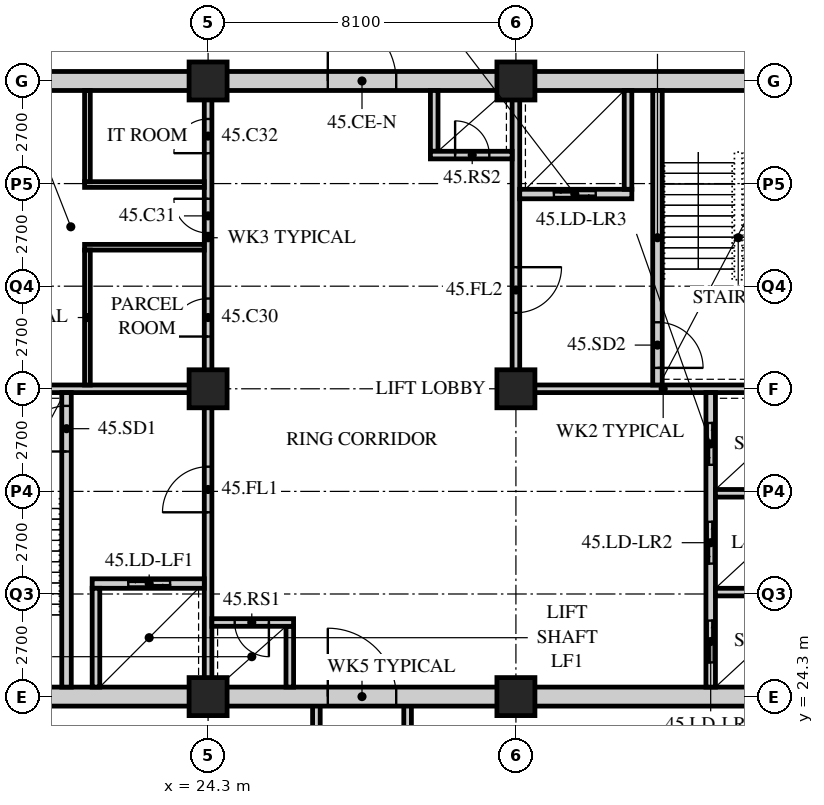
"""IFC4 building model, lengths in metres.
Left out: names, types, materials, properties, quantities, classifications, styles, units other than length and angle.
Written with IfcOpenShell. Run it as: python <this file> out.ifc"""

import sys

from ifc_helpers import new_model, si_unit, direction, frame, frame_2d, origin, origin_2d, place, context, subcontext, project, spatial, rectangle, hollow_rectangle, extrude, element, fill, save


model = new_model("IFC4")
c1 = context("Model", 3, precision=1e-05, world=origin(), true_north=direction((0.0, 1.0)))
c2 = subcontext(c1, "Body", "Model", "MODEL_VIEW")
j1 = project(units=[si_unit("LENGTHUNIT", "METRE"), si_unit("PLANEANGLEUNIT", "RADIAN")], contexts=[c1])
p1 = place(None, origin())
s1 = spatial("IfcSite", under=j1, at=p1, CompositionType="ELEMENT")
p2 = place(p1, origin())
s2 = spatial("IfcBuilding", under=s1, at=p2, CompositionType="ELEMENT")
p3 = place(p2, frame((0.0, 0.0, 177.6)))
s3 = spatial("IfcBuildingStorey", under=s2, at=p3, CompositionType="ELEMENT", Elevation=177.6)
for number, where, z_axis, x_axis in (
    (1, (24.3, 24.3, 0.0), (0.0, 0.0, 1.0), (1.0, 0.0, 0.0)),
    (2, (24.3, 32.4, 0.0), (0.0, 0.0, 1.0), (1.0, 0.0, 0.0)),
    (3, (24.3, 40.5, 0.0), (0.0, 0.0, 1.0), (1.0, 0.0, 0.0)),
    (4, (32.4, 24.3, 0.0), (0.0, 0.0, 1.0), (1.0, 0.0, 0.0)),
    (5, (32.4, 32.4, 0.0), (0.0, 0.0, 1.0), (1.0, 0.0, 0.0)),
    (6, (32.4, 40.5, 0.0), (0.0, 0.0, 1.0), (1.0, 0.0, 0.0)),
):
    element("IfcColumn", number, at=place(p3, frame(where, z_axis=z_axis, x_axis=x_axis)), inside=s3, PredefinedType="COLUMN", context=c2, shape_type="SweptSolid", body=[
        extrude(hollow_rectangle(XDim=1.0, YDim=1.0, WallThickness=0.1, at=origin_2d()), origin(), (0.0, 0.0, 1.0), 3.6),
    ])
for number, where, z_axis, x_axis in (
    (7, (27.15, 20.7, 0.0), (0.0, 0.0, 1.0), (0.0, 1.0, 0.0)),
    (8, (29.55, 20.7, 0.0), (0.0, 0.0, 1.0), (0.0, 1.0, 0.0)),
):
    element("IfcWall", number, at=place(p3, frame(where, z_axis=z_axis, x_axis=x_axis)), inside=s3, PredefinedType="SOLIDWALL", context=c2, shape_type="SweptSolid", body=[
        extrude(rectangle(XDim=3.6, YDim=0.2, at=frame_2d((1.8, 0.0))), origin(), (0.0, 0.0, 1.0), 3.39),
    ])
p4 = place(p3, frame((15.95, 24.3, 0.0), z_axis=(0.0, 0.0, 1.0), x_axis=(1.0, 0.0, 0.0)))
e9 = element("IfcWall", 9, at=p4, inside=s3, PredefinedType="SOLIDWALL", context=c2, shape_type="SweptSolid", body=[
    extrude(rectangle(XDim=24.8, YDim=0.5, at=frame_2d((12.4, 0.0))), origin(), (0.0, 0.0, 1.0), 2.74),
])
p5 = place(p4, frame((11.5, 0.0, 0.0)))
e10 = element("IfcOpeningElement", 10, at=p5, cuts=e9, PredefinedType="OPENING", context=c2, shape_type="SweptSolid", body=[
    extrude(rectangle(XDim=1.8, YDim=2.4, at=frame_2d((0.9, 1.2))), frame((0.0, 0.26, 0.0), z_axis=(0.0, -1.0, 0.0), x_axis=(1.0, 0.0, 0.0)), (0.0, 0.0, 1.0), 0.52),
])
p6 = place(p3, frame((15.95, 40.5, 0.0), z_axis=(0.0, 0.0, 1.0), x_axis=(1.0, 0.0, 0.0)))
e11 = element("IfcWall", 11, at=p6, inside=s3, PredefinedType="SOLIDWALL", context=c2, shape_type="SweptSolid", body=[
    extrude(rectangle(XDim=24.8, YDim=0.5, at=frame_2d((12.4, 0.0))), origin(), (0.0, 0.0, 1.0), 2.74),
])
p7 = place(p6, frame((11.5, 0.0, 0.0)))
e12 = element("IfcOpeningElement", 12, at=p7, cuts=e11, PredefinedType="OPENING", context=c2, shape_type="SweptSolid", body=[
    extrude(rectangle(XDim=1.8, YDim=2.4, at=frame_2d((0.9, 1.2))), frame((0.0, 0.26, 0.0), z_axis=(0.0, -1.0, 0.0), x_axis=(1.0, 0.0, 0.0)), (0.0, 0.0, 1.0), 0.52),
])
p8 = place(p3, frame((16.45, 32.4, 0.0), z_axis=(0.0, 0.0, 1.0), x_axis=(1.0, 0.0, 0.0)))
e13 = element("IfcWall", 13, at=p8, inside=s3, PredefinedType="SOLIDWALL", context=c2, shape_type="SweptSolid", body=[
    extrude(rectangle(XDim=7.95, YDim=0.2, at=frame_2d((3.975, 0.0))), origin(), (0.0, 0.0, 1.0), 2.778),
])
p9 = place(p3, frame((24.3, 24.55, 0.0), z_axis=(0.0, 0.0, 1.0), x_axis=(0.0, 1.0, 0.0)))
e14 = element("IfcWall", 14, at=p9, inside=s3, PredefinedType="SOLIDWALL", context=c2, shape_type="SweptSolid", body=[
    extrude(rectangle(XDim=7.75, YDim=0.2, at=frame_2d((3.875, 0.0))), origin(), (0.0, 0.0, 1.0), 2.778),
])
p10 = place(p9, frame((4.6, 0.0, 0.0)))
e15 = element("IfcOpeningElement", 15, at=p10, cuts=e14, PredefinedType="OPENING", context=c2, shape_type="SweptSolid", body=[
    extrude(rectangle(XDim=1.2, YDim=2.1, at=frame_2d((0.6, 1.05))), frame((0.0, 0.11, 0.0), z_axis=(0.0, -1.0, 0.0), x_axis=(1.0, 0.0, 0.0)), (0.0, 0.0, 1.0), 0.22),
])
p11 = place(p3, frame((20.575, 24.55, 0.0), z_axis=(0.0, 0.0, 1.0), x_axis=(0.0, 1.0, 0.0)))
e16 = element("IfcWall", 16, at=p11, inside=s3, PredefinedType="SOLIDWALL", context=c2, shape_type="SweptSolid", body=[
    extrude(rectangle(XDim=7.75, YDim=0.25, at=frame_2d((3.875, 0.0))), origin(), (0.0, 0.0, 1.0), 3.39),
])
p12 = place(p11, frame((6.2, 0.0, 0.0)))
e17 = element("IfcOpeningElement", 17, at=p12, cuts=e16, PredefinedType="OPENING", context=c2, shape_type="SweptSolid", body=[
    extrude(rectangle(XDim=1.2, YDim=2.1, at=frame_2d((0.6, 1.05))), frame((0.0, 0.135, 0.0), z_axis=(0.0, -1.0, 0.0), x_axis=(1.0, 0.0, 0.0)), (0.0, 0.0, 1.0), 0.27),
])
p13 = place(p3, frame((21.25, 27.275, 0.0), z_axis=(0.0, 0.0, 1.0), x_axis=(1.0, 0.0, 0.0)))
e18 = element("IfcWall", 18, at=p13, inside=s3, PredefinedType="SOLIDWALL", context=c2, shape_type="SweptSolid", body=[
    extrude(rectangle(XDim=2.95, YDim=0.25, at=frame_2d((1.475, 0.0))), origin(), (0.0, 0.0, 1.0), 3.39),
])
p14 = place(p13, frame((0.95, 0.0, 0.0)))
e19 = element("IfcOpeningElement", 19, at=p14, cuts=e18, PredefinedType="OPENING", context=c2, shape_type="SweptSolid", body=[
    extrude(rectangle(XDim=1.1, YDim=2.4, at=frame_2d((0.55, 1.2))), frame((0.0, 0.135, 0.0), z_axis=(0.0, -1.0, 0.0), x_axis=(1.0, 0.0, 0.0)), (0.0, 0.0, 1.0), 0.27),
])
p15 = place(p3, frame((21.35, 24.55, 0.0), z_axis=(0.0, 0.0, 1.0), x_axis=(0.0, 1.0, 0.0)))
e20 = element("IfcWall", 20, at=p15, inside=s3, PredefinedType="SOLIDWALL", context=c2, shape_type="SweptSolid", body=[
    extrude(rectangle(XDim=2.6, YDim=0.2, at=frame_2d((1.3, 0.0))), origin(), (0.0, 0.0, 1.0), 3.39),
])
p16 = place(p3, frame((26.45, 24.55, 0.0), z_axis=(0.0, 0.0, 1.0), x_axis=(0.0, 1.0, 0.0)))
e21 = element("IfcWall", 21, at=p16, inside=s3, PredefinedType="SOLIDWALL", context=c2, shape_type="SweptSolid", body=[
    extrude(rectangle(XDim=1.6, YDim=0.2, at=frame_2d((0.8, 0.0))), origin(), (0.0, 0.0, 1.0), 3.39),
])
p17 = place(p3, frame((24.4, 26.25, 0.0), z_axis=(0.0, 0.0, 1.0), x_axis=(1.0, 0.0, 0.0)))
e22 = element("IfcWall", 22, at=p17, inside=s3, PredefinedType="SOLIDWALL", context=c2, shape_type="SweptSolid", body=[
    extrude(rectangle(XDim=2.15, YDim=0.2, at=frame_2d((1.075, 0.0))), origin(), (0.0, 0.0, 1.0), 3.39),
])
p18 = place(p17, frame((0.6, 0.0, 0.0)))
e23 = element("IfcOpeningElement", 23, at=p18, cuts=e22, PredefinedType="OPENING", context=c2, shape_type="SweptSolid", body=[
    extrude(rectangle(XDim=0.9, YDim=2.1, at=frame_2d((0.45, 1.05))), frame((0.0, 0.11, 0.0), z_axis=(0.0, -1.0, 0.0), x_axis=(1.0, 0.0, 0.0)), (0.0, 0.0, 1.0), 0.22),
])
p19 = place(p3, frame((32.3, 32.4, 0.0), z_axis=(0.0, 0.0, 1.0), x_axis=(1.0, 0.0, 0.0)))
e24 = element("IfcWall", 24, at=p19, inside=s3, PredefinedType="SOLIDWALL", context=c2, shape_type="SweptSolid", body=[
    extrude(rectangle(XDim=7.95, YDim=0.2, at=frame_2d((3.975, 0.0))), origin(), (0.0, 0.0, 1.0), 2.778),
])
p20 = place(p3, frame((32.4, 32.5, 0.0), z_axis=(0.0, 0.0, 1.0), x_axis=(0.0, 1.0, 0.0)))
e25 = element("IfcWall", 25, at=p20, inside=s3, PredefinedType="SOLIDWALL", context=c2, shape_type="SweptSolid", body=[
    extrude(rectangle(XDim=7.75, YDim=0.2, at=frame_2d((3.875, 0.0))), origin(), (0.0, 0.0, 1.0), 2.778),
])
p21 = place(p20, frame((1.9, 0.0, 0.0)))
e26 = element("IfcOpeningElement", 26, at=p21, cuts=e25, PredefinedType="OPENING", context=c2, shape_type="SweptSolid", body=[
    extrude(rectangle(XDim=1.2, YDim=2.1, at=frame_2d((0.6, 1.05))), frame((0.0, 0.11, 0.0), z_axis=(0.0, -1.0, 0.0), x_axis=(1.0, 0.0, 0.0)), (0.0, 0.0, 1.0), 0.22),
])
p22 = place(p3, frame((37.525, 24.55, 0.0), z_axis=(0.0, 0.0, 1.0), x_axis=(0.0, 1.0, 0.0)))
e27 = element("IfcWall", 27, at=p22, inside=s3, PredefinedType="SOLIDWALL", context=c2, shape_type="SweptSolid", body=[
    extrude(rectangle(XDim=7.75, YDim=0.25, at=frame_2d((3.875, 0.0))), origin(), (0.0, 0.0, 1.0), 3.39),
])
p23 = place(p22, frame((0.65, 0.0, 0.0)))
e28 = element("IfcOpeningElement", 28, at=p23, cuts=e27, PredefinedType="OPENING", context=c2, shape_type="SweptSolid", body=[
    extrude(rectangle(XDim=1.1, YDim=2.4, at=frame_2d((0.55, 1.2))), frame((0.0, 0.135, 0.0), z_axis=(0.0, -1.0, 0.0), x_axis=(1.0, 0.0, 0.0)), (0.0, 0.0, 1.0), 0.27),
])
p24 = place(p22, frame((3.25, 0.0, 0.0)))
e29 = element("IfcOpeningElement", 29, at=p24, cuts=e27, PredefinedType="OPENING", context=c2, shape_type="SweptSolid", body=[
    extrude(rectangle(XDim=1.1, YDim=2.4, at=frame_2d((0.55, 1.2))), frame((0.0, 0.135, 0.0), z_axis=(0.0, -1.0, 0.0), x_axis=(1.0, 0.0, 0.0)), (0.0, 0.0, 1.0), 0.27),
])
p25 = place(p22, frame((5.85, 0.0, 0.0)))
e30 = element("IfcOpeningElement", 30, at=p25, cuts=e27, PredefinedType="OPENING", context=c2, shape_type="SweptSolid", body=[
    extrude(rectangle(XDim=1.1, YDim=2.4, at=frame_2d((0.55, 1.2))), frame((0.0, 0.135, 0.0), z_axis=(0.0, -1.0, 0.0), x_axis=(1.0, 0.0, 0.0)), (0.0, 0.0, 1.0), 0.27),
])
for number, where, z_axis, x_axis in (
    (31, (37.65, 27.05, 0.0), (0.0, 0.0, 1.0), (1.0, 0.0, 0.0)),
    (32, (37.65, 29.65, 0.0), (0.0, 0.0, 1.0), (1.0, 0.0, 0.0)),
):
    element("IfcWall", number, at=place(p3, frame(where, z_axis=z_axis, x_axis=x_axis)), inside=s3, PredefinedType="SOLIDWALL", context=c2, shape_type="SweptSolid", body=[
        extrude(rectangle(XDim=2.6, YDim=0.2, at=frame_2d((1.3, 0.0))), origin(), (0.0, 0.0, 1.0), 3.39),
    ])
p26 = place(p3, frame((36.125, 32.5, 0.0), z_axis=(0.0, 0.0, 1.0), x_axis=(0.0, 1.0, 0.0)))
e33 = element("IfcWall", 33, at=p26, inside=s3, PredefinedType="SOLIDWALL", context=c2, shape_type="SweptSolid", body=[
    extrude(rectangle(XDim=7.75, YDim=0.25, at=frame_2d((3.875, 0.0))), origin(), (0.0, 0.0, 1.0), 3.39),
])
p27 = place(p26, frame((0.45, 0.0, 0.0)))
e34 = element("IfcOpeningElement", 34, at=p27, cuts=e33, PredefinedType="OPENING", context=c2, shape_type="SweptSolid", body=[
    extrude(rectangle(XDim=1.2, YDim=2.1, at=frame_2d((0.6, 1.05))), frame((0.0, 0.135, 0.0), z_axis=(0.0, -1.0, 0.0), x_axis=(1.0, 0.0, 0.0)), (0.0, 0.0, 1.0), 0.27),
])
p28 = place(p3, frame((32.5, 37.525, 0.0), z_axis=(0.0, 0.0, 1.0), x_axis=(1.0, 0.0, 0.0)))
e35 = element("IfcWall", 35, at=p28, inside=s3, PredefinedType="SOLIDWALL", context=c2, shape_type="SweptSolid", body=[
    extrude(rectangle(XDim=2.95, YDim=0.25, at=frame_2d((1.475, 0.0))), origin(), (0.0, 0.0, 1.0), 3.39),
])
p29 = place(p28, frame((0.9, 0.0, 0.0)))
e36 = element("IfcOpeningElement", 36, at=p29, cuts=e35, PredefinedType="OPENING", context=c2, shape_type="SweptSolid", body=[
    extrude(rectangle(XDim=1.1, YDim=2.4, at=frame_2d((0.55, 1.2))), frame((0.0, 0.135, 0.0), z_axis=(0.0, -1.0, 0.0), x_axis=(1.0, 0.0, 0.0)), (0.0, 0.0, 1.0), 0.27),
])
p30 = place(p3, frame((35.35, 37.65, 0.0), z_axis=(0.0, 0.0, 1.0), x_axis=(0.0, 1.0, 0.0)))
e37 = element("IfcWall", 37, at=p30, inside=s3, PredefinedType="SOLIDWALL", context=c2, shape_type="SweptSolid", body=[
    extrude(rectangle(XDim=2.6, YDim=0.2, at=frame_2d((1.3, 0.0))), origin(), (0.0, 0.0, 1.0), 3.39),
])
p31 = place(p3, frame((30.25, 38.65, 0.0), z_axis=(0.0, 0.0, 1.0), x_axis=(0.0, 1.0, 0.0)))
e38 = element("IfcWall", 38, at=p31, inside=s3, PredefinedType="SOLIDWALL", context=c2, shape_type="SweptSolid", body=[
    extrude(rectangle(XDim=1.6, YDim=0.2, at=frame_2d((0.8, 0.0))), origin(), (0.0, 0.0, 1.0), 3.39),
])
p32 = place(p3, frame((30.15, 38.55, 0.0), z_axis=(0.0, 0.0, 1.0), x_axis=(1.0, 0.0, 0.0)))
e39 = element("IfcWall", 39, at=p32, inside=s3, PredefinedType="SOLIDWALL", context=c2, shape_type="SweptSolid", body=[
    extrude(rectangle(XDim=2.15, YDim=0.2, at=frame_2d((1.075, 0.0))), origin(), (0.0, 0.0, 1.0), 3.39),
])
p33 = place(p32, frame((0.65, 0.0, 0.0)))
e40 = element("IfcOpeningElement", 40, at=p33, cuts=e39, PredefinedType="OPENING", context=c2, shape_type="SweptSolid", body=[
    extrude(rectangle(XDim=0.9, YDim=2.1, at=frame_2d((0.45, 1.05))), frame((0.0, 0.11, 0.0), z_axis=(0.0, -1.0, 0.0), x_axis=(1.0, 0.0, 0.0)), (0.0, 0.0, 1.0), 0.22),
])
p34 = place(p3, frame((24.3, 32.5, 0.0), z_axis=(0.0, 0.0, 1.0), x_axis=(0.0, 1.0, 0.0)))
e41 = element("IfcWall", 41, at=p34, inside=s3, PredefinedType="PARTITIONING", context=c2, shape_type="SweptSolid", body=[
    extrude(rectangle(XDim=7.75, YDim=0.2, at=frame_2d((3.875, 0.0))), origin(), (0.0, 0.0, 1.0), 2.778),
])
p35 = place(p34, frame((1.275, 0.0, 0.0)))
e42 = element("IfcOpeningElement", 42, at=p35, cuts=e41, PredefinedType="OPENING", context=c2, shape_type="SweptSolid", body=[
    extrude(rectangle(XDim=1.0, YDim=2.1, at=frame_2d((0.5, 1.05))), frame((0.0, 0.11, 0.0), z_axis=(0.0, -1.0, 0.0), x_axis=(1.0, 0.0, 0.0)), (0.0, 0.0, 1.0), 0.22),
])
p36 = place(p34, frame((4.0, 0.0, 0.0)))
e43 = element("IfcOpeningElement", 43, at=p36, cuts=e41, PredefinedType="OPENING", context=c2, shape_type="SweptSolid", body=[
    extrude(rectangle(XDim=0.9, YDim=2.1, at=frame_2d((0.45, 1.05))), frame((0.0, 0.11, 0.0), z_axis=(0.0, -1.0, 0.0), x_axis=(1.0, 0.0, 0.0)), (0.0, 0.0, 1.0), 0.22),
])
p37 = place(p34, frame((6.1, 0.0, 0.0)))
e44 = element("IfcOpeningElement", 44, at=p37, cuts=e41, PredefinedType="OPENING", context=c2, shape_type="SweptSolid", body=[
    extrude(rectangle(XDim=0.9, YDim=2.1, at=frame_2d((0.45, 1.05))), frame((0.0, 0.11, 0.0), z_axis=(0.0, -1.0, 0.0), x_axis=(1.0, 0.0, 0.0)), (0.0, 0.0, 1.0), 0.22),
])
for number, where, z_axis, x_axis in (
    (45, (21.05, 36.125, 0.0), (0.0, 0.0, 1.0), (1.0, 0.0, 0.0)),
    (46, (21.05, 37.775, 0.0), (0.0, 0.0, 1.0), (1.0, 0.0, 0.0)),
):
    element("IfcWall", number, at=place(p3, frame(where, z_axis=z_axis, x_axis=x_axis)), inside=s3, PredefinedType="PARTITIONING", context=c2, shape_type="SweptSolid", body=[
        extrude(rectangle(XDim=3.15, YDim=0.15, at=frame_2d((1.575, 0.0))), origin(), (0.0, 0.0, 1.0), 3.39),
    ])
p38 = place(p3, frame((21.125, 32.5, 0.0), z_axis=(0.0, 0.0, 1.0), x_axis=(0.0, 1.0, 0.0)))
e47 = element("IfcWall", 47, at=p38, inside=s3, PredefinedType="PARTITIONING", context=c2, shape_type="SweptSolid", body=[
    extrude(rectangle(XDim=3.55, YDim=0.15, at=frame_2d((1.775, 0.0))), origin(), (0.0, 0.0, 1.0), 3.39),
])
p39 = place(p3, frame((21.125, 37.85, 0.0), z_axis=(0.0, 0.0, 1.0), x_axis=(0.0, 1.0, 0.0)))
e48 = element("IfcWall", 48, at=p39, inside=s3, PredefinedType="PARTITIONING", context=c2, shape_type="SweptSolid", body=[
    extrude(rectangle(XDim=2.4, YDim=0.15, at=frame_2d((1.2, 0.0))), origin(), (0.0, 0.0, 1.0), 3.39),
])
p40 = place(p35, origin())
e49 = element("IfcDoor", 49, at=p40, inside=s3, OperationType="SINGLE_SWING_LEFT", PredefinedType="DOOR", context=c2, shape_type="SweptSolid", body=[
    extrude(rectangle(XDim=1.0, YDim=2.1, at=frame_2d((0.5, 1.05))), frame((0.0, 0.025, 0.0), z_axis=(0.0, -1.0, 0.0), x_axis=(1.0, 0.0, 0.0)), (0.0, 0.0, 1.0), 0.05),
])
fill(e42, e49)
p41 = place(p36, origin())
e50 = element("IfcDoor", 50, at=p41, inside=s3, OperationType="SINGLE_SWING_RIGHT", PredefinedType="DOOR", context=c2, shape_type="SweptSolid", body=[
    extrude(rectangle(XDim=0.9, YDim=2.1, at=frame_2d((0.45, 1.05))), frame((0.0, 0.025, 0.0), z_axis=(0.0, -1.0, 0.0), x_axis=(1.0, 0.0, 0.0)), (0.0, 0.0, 1.0), 0.05),
])
fill(e43, e50)
p42 = place(p37, origin())
e51 = element("IfcDoor", 51, at=p42, inside=s3, OperationType="SINGLE_SWING_LEFT", PredefinedType="DOOR", context=c2, shape_type="SweptSolid", body=[
    extrude(rectangle(XDim=0.9, YDim=2.1, at=frame_2d((0.45, 1.05))), frame((0.0, 0.025, 0.0), z_axis=(0.0, -1.0, 0.0), x_axis=(1.0, 0.0, 0.0)), (0.0, 0.0, 1.0), 0.05),
])
fill(e44, e51)
p43 = place(p12, origin())
e52 = element("IfcDoor", 52, at=p43, inside=s3, OperationType="SINGLE_SWING_LEFT", PredefinedType="DOOR", context=c2, shape_type="SweptSolid", body=[
    extrude(rectangle(XDim=1.2, YDim=2.1, at=frame_2d((0.6, 1.05))), frame((0.0, 0.025, 0.0), z_axis=(0.0, -1.0, 0.0), x_axis=(1.0, 0.0, 0.0)), (0.0, 0.0, 1.0), 0.05),
])
fill(e17, e52)
p44 = place(p10, origin())
e53 = element("IfcDoor", 53, at=p44, inside=s3, OperationType="SINGLE_SWING_LEFT", PredefinedType="DOOR", context=c2, shape_type="SweptSolid", body=[
    extrude(rectangle(XDim=1.2, YDim=2.1, at=frame_2d((0.6, 1.05))), frame((0.0, 0.025, 0.0), z_axis=(0.0, -1.0, 0.0), x_axis=(1.0, 0.0, 0.0)), (0.0, 0.0, 1.0), 0.05),
])
fill(e15, e53)
p45 = place(p18, origin())
e54 = element("IfcDoor", 54, at=p45, inside=s3, OperationType="SINGLE_SWING_LEFT", PredefinedType="DOOR", context=c2, shape_type="SweptSolid", body=[
    extrude(rectangle(XDim=0.9, YDim=2.1, at=frame_2d((0.45, 1.05))), frame((0.0, 0.025, 0.0), z_axis=(0.0, -1.0, 0.0), x_axis=(1.0, 0.0, 0.0)), (0.0, 0.0, 1.0), 0.05),
])
fill(e23, e54)
p46 = place(p27, origin())
e55 = element("IfcDoor", 55, at=p46, inside=s3, OperationType="SINGLE_SWING_RIGHT", PredefinedType="DOOR", context=c2, shape_type="SweptSolid", body=[
    extrude(rectangle(XDim=1.2, YDim=2.1, at=frame_2d((0.6, 1.05))), frame((0.0, 0.025, 0.0), z_axis=(0.0, -1.0, 0.0), x_axis=(1.0, 0.0, 0.0)), (0.0, 0.0, 1.0), 0.05),
])
fill(e34, e55)
p47 = place(p21, origin())
e56 = element("IfcDoor", 56, at=p47, inside=s3, OperationType="SINGLE_SWING_LEFT", PredefinedType="DOOR", context=c2, shape_type="SweptSolid", body=[
    extrude(rectangle(XDim=1.2, YDim=2.1, at=frame_2d((0.6, 1.05))), frame((0.0, 0.025, 0.0), z_axis=(0.0, -1.0, 0.0), x_axis=(1.0, 0.0, 0.0)), (0.0, 0.0, 1.0), 0.05),
])
fill(e26, e56)
p48 = place(p33, origin())
e57 = element("IfcDoor", 57, at=p48, inside=s3, OperationType="SINGLE_SWING_LEFT", PredefinedType="DOOR", context=c2, shape_type="SweptSolid", body=[
    extrude(rectangle(XDim=0.9, YDim=2.1, at=frame_2d((0.45, 1.05))), frame((0.0, 0.025, 0.0), z_axis=(0.0, -1.0, 0.0), x_axis=(1.0, 0.0, 0.0)), (0.0, 0.0, 1.0), 0.05),
])
fill(e40, e57)
p49 = place(p23, origin())
e58 = element("IfcDoor", 58, at=p49, inside=s3, OperationType="DOUBLE_DOOR_SLIDING", PredefinedType="DOOR", context=c2, shape_type="SweptSolid", body=[
    extrude(rectangle(XDim=1.1, YDim=2.4, at=frame_2d((0.55, 1.2))), frame((0.0, 0.025, 0.0), z_axis=(0.0, -1.0, 0.0), x_axis=(1.0, 0.0, 0.0)), (0.0, 0.0, 1.0), 0.05),
])
fill(e28, e58)
p50 = place(p24, origin())
e59 = element("IfcDoor", 59, at=p50, inside=s3, OperationType="DOUBLE_DOOR_SLIDING", PredefinedType="DOOR", context=c2, shape_type="SweptSolid", body=[
    extrude(rectangle(XDim=1.1, YDim=2.4, at=frame_2d((0.55, 1.2))), frame((0.0, 0.025, 0.0), z_axis=(0.0, -1.0, 0.0), x_axis=(1.0, 0.0, 0.0)), (0.0, 0.0, 1.0), 0.05),
])
fill(e29, e59)
p51 = place(p25, origin())
e60 = element("IfcDoor", 60, at=p51, inside=s3, OperationType="DOUBLE_DOOR_SLIDING", PredefinedType="DOOR", context=c2, shape_type="SweptSolid", body=[
    extrude(rectangle(XDim=1.1, YDim=2.4, at=frame_2d((0.55, 1.2))), frame((0.0, 0.025, 0.0), z_axis=(0.0, -1.0, 0.0), x_axis=(1.0, 0.0, 0.0)), (0.0, 0.0, 1.0), 0.05),
])
fill(e30, e60)
p52 = place(p14, origin())
e61 = element("IfcDoor", 61, at=p52, inside=s3, OperationType="DOUBLE_DOOR_SLIDING", PredefinedType="DOOR", context=c2, shape_type="SweptSolid", body=[
    extrude(rectangle(XDim=1.1, YDim=2.4, at=frame_2d((0.55, 1.2))), frame((0.0, 0.025, 0.0), z_axis=(0.0, -1.0, 0.0), x_axis=(1.0, 0.0, 0.0)), (0.0, 0.0, 1.0), 0.05),
])
fill(e19, e61)
p53 = place(p29, origin())
e62 = element("IfcDoor", 62, at=p53, inside=s3, OperationType="DOUBLE_DOOR_SLIDING", PredefinedType="DOOR", context=c2, shape_type="SweptSolid", body=[
    extrude(rectangle(XDim=1.1, YDim=2.4, at=frame_2d((0.55, 1.2))), frame((0.0, 0.025, 0.0), z_axis=(0.0, -1.0, 0.0), x_axis=(1.0, 0.0, 0.0)), (0.0, 0.0, 1.0), 0.05),
])
fill(e36, e62)
p54 = place(p5, origin())
e63 = element("IfcDoor", 63, at=p54, inside=s3, OperationType="DOUBLE_DOOR_SINGLE_SWING", PredefinedType="DOOR", context=c2, shape_type="SweptSolid", body=[
    extrude(rectangle(XDim=1.8, YDim=2.4, at=frame_2d((0.9, 1.2))), frame((0.0, 0.025, 0.0), z_axis=(0.0, -1.0, 0.0), x_axis=(1.0, 0.0, 0.0)), (0.0, 0.0, 1.0), 0.05),
])
fill(e10, e63)
p55 = place(p7, origin())
e64 = element("IfcDoor", 64, at=p55, inside=s3, OperationType="DOUBLE_DOOR_SINGLE_SWING", PredefinedType="DOOR", context=c2, shape_type="SweptSolid", body=[
    extrude(rectangle(XDim=1.8, YDim=2.4, at=frame_2d((0.9, 1.2))), frame((0.0, 0.025, 0.0), z_axis=(0.0, -1.0, 0.0), x_axis=(1.0, 0.0, 0.0)), (0.0, 0.0, 1.0), 0.05),
])
fill(e12, e64)
save(model, sys.argv[1])
